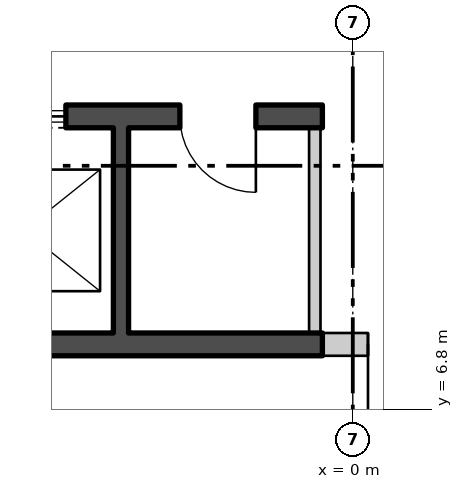
"""IFC4 building model, lengths in metres.
Left out: names, types, materials, properties, quantities, classifications, styles, units other than length and angle.
Written with IfcOpenShell. Run it as: python <this file> out.ifc"""

import sys

from ifc_helpers import new_model, si_unit, direction, frame, frame_2d, origin, place, context, subcontext, project, spatial, polyline, rectangle, outline, extrude, element, fill, save


model = new_model("IFC4")
c1 = context("Model", 3, precision=1e-05, world=origin(), true_north=direction((0.0, 1.0)))
c2 = subcontext(c1, "Body", "Model", "MODEL_VIEW")
j1 = project(units=[si_unit("LENGTHUNIT", "METRE"), si_unit("PLANEANGLEUNIT", "RADIAN")], contexts=[c1])
p1 = place(None, origin())
s1 = spatial("IfcSite", under=j1, at=p1, CompositionType="ELEMENT")
p2 = place(p1, origin())
s2 = spatial("IfcBuilding", under=s1, at=p2, CompositionType="ELEMENT")
p3 = place(p2, frame((0.0, 0.0, 280.5)))
s3 = spatial("IfcBuildingStorey", under=s2, at=p3, CompositionType="ELEMENT", Elevation=280.5)
p4 = place(p3, frame((-25.385, 15.619, -0.18), z_axis=(0.0, 0.0, 1.0), x_axis=(0.500000711659, -0.866024992908, 0.0)))
e1 = element("IfcWall", 1, at=p4, inside=s3, PredefinedType="SOLIDWALL", context=c2, shape_type="SweptSolid", body=[
    extrude(outline(polyline([(-0.13, -0.225), (45.87, -0.225), (45.61, 0.225), (0.13, 0.225), (-0.13, -0.225)])), origin(), (0.0, 0.0, 1.0), 3.68),
])
p5 = place(p4, frame((1.424, 0.0, 1.08)))
e2 = element("IfcOpeningElement", 2, at=p5, cuts=e1, PredefinedType="OPENING", context=c2, shape_type="SweptSolid", body=[
    extrude(rectangle(XDim=2.4, YDim=2.0, at=frame_2d((1.2, 1.0))), frame((0.0, 0.235, 0.0), z_axis=(0.0, -1.0, 0.0), x_axis=(1.0, 0.0, 0.0)), (0.0, 0.0, 1.0), 0.47),
])
p6 = place(p4, frame((5.893, 0.0, 1.08)))
e3 = element("IfcOpeningElement", 3, at=p6, cuts=e1, PredefinedType="OPENING", context=c2, shape_type="SweptSolid", body=[
    extrude(rectangle(XDim=2.4, YDim=2.0, at=frame_2d((1.2, 1.0))), frame((0.0, 0.235, 0.0), z_axis=(0.0, -1.0, 0.0), x_axis=(1.0, 0.0, 0.0)), (0.0, 0.0, 1.0), 0.47),
])
p7 = place(p4, frame((10.401, 0.0, 1.08)))
e4 = element("IfcOpeningElement", 4, at=p7, cuts=e1, PredefinedType="OPENING", context=c2, shape_type="SweptSolid", body=[
    extrude(rectangle(XDim=2.4, YDim=2.0, at=frame_2d((1.2, 1.0))), frame((0.0, 0.235, 0.0), z_axis=(0.0, -1.0, 0.0), x_axis=(1.0, 0.0, 0.0)), (0.0, 0.0, 1.0), 0.47),
])
p8 = place(p4, frame((14.909, 0.0, 1.08)))
e5 = element("IfcOpeningElement", 5, at=p8, cuts=e1, PredefinedType="OPENING", context=c2, shape_type="SweptSolid", body=[
    extrude(rectangle(XDim=2.4, YDim=2.0, at=frame_2d((1.2, 1.0))), frame((0.0, 0.235, 0.0), z_axis=(0.0, -1.0, 0.0), x_axis=(1.0, 0.0, 0.0)), (0.0, 0.0, 1.0), 0.47),
])
p9 = place(p4, frame((19.416, 0.0, 1.08)))
e6 = element("IfcOpeningElement", 6, at=p9, cuts=e1, PredefinedType="OPENING", context=c2, shape_type="SweptSolid", body=[
    extrude(rectangle(XDim=2.4, YDim=2.0, at=frame_2d((1.2, 1.0))), frame((0.0, 0.235, 0.0), z_axis=(0.0, -1.0, 0.0), x_axis=(1.0, 0.0, 0.0)), (0.0, 0.0, 1.0), 0.47),
])
p10 = place(p4, frame((23.924, 0.0, 1.08)))
e7 = element("IfcOpeningElement", 7, at=p10, cuts=e1, PredefinedType="OPENING", context=c2, shape_type="SweptSolid", body=[
    extrude(rectangle(XDim=2.4, YDim=2.0, at=frame_2d((1.2, 1.0))), frame((0.0, 0.235, 0.0), z_axis=(0.0, -1.0, 0.0), x_axis=(1.0, 0.0, 0.0)), (0.0, 0.0, 1.0), 0.47),
])
p11 = place(p4, frame((28.431, 0.0, 1.08)))
e8 = element("IfcOpeningElement", 8, at=p11, cuts=e1, PredefinedType="OPENING", context=c2, shape_type="SweptSolid", body=[
    extrude(rectangle(XDim=2.4, YDim=2.0, at=frame_2d((1.2, 1.0))), frame((0.0, 0.235, 0.0), z_axis=(0.0, -1.0, 0.0), x_axis=(1.0, 0.0, 0.0)), (0.0, 0.0, 1.0), 0.47),
])
p12 = place(p4, frame((32.939, 0.0, 1.08)))
e9 = element("IfcOpeningElement", 9, at=p12, cuts=e1, PredefinedType="OPENING", context=c2, shape_type="SweptSolid", body=[
    extrude(rectangle(XDim=2.4, YDim=2.0, at=frame_2d((1.2, 1.0))), frame((0.0, 0.235, 0.0), z_axis=(0.0, -1.0, 0.0), x_axis=(1.0, 0.0, 0.0)), (0.0, 0.0, 1.0), 0.47),
])
p13 = place(p4, frame((37.447, 0.0, 1.08)))
e10 = element("IfcOpeningElement", 10, at=p13, cuts=e1, PredefinedType="OPENING", context=c2, shape_type="SweptSolid", body=[
    extrude(rectangle(XDim=2.4, YDim=2.0, at=frame_2d((1.2, 1.0))), frame((0.0, 0.235, 0.0), z_axis=(0.0, -1.0, 0.0), x_axis=(1.0, 0.0, 0.0)), (0.0, 0.0, 1.0), 0.47),
])
p14 = place(p4, frame((41.916, 0.0, 1.08)))
e11 = element("IfcOpeningElement", 11, at=p14, cuts=e1, PredefinedType="OPENING", context=c2, shape_type="SweptSolid", body=[
    extrude(rectangle(XDim=2.4, YDim=2.0, at=frame_2d((1.2, 1.0))), frame((0.0, 0.235, 0.0), z_axis=(0.0, -1.0, 0.0), x_axis=(1.0, 0.0, 0.0)), (0.0, 0.0, 1.0), 0.47),
])
p15 = place(p3, frame((-10.7, 10.65, 0.0), z_axis=(0.0, 0.0, 1.0), x_axis=(1.0, 0.0, 0.0)))
e12 = element("IfcWall", 12, at=p15, inside=s3, PredefinedType="SHEAR", context=c2, shape_type="SweptSolid", body=[
    extrude(rectangle(XDim=10.3, YDim=0.3, at=frame_2d((5.15, 0.0))), origin(), (0.0, 0.0, 1.0), 3.7),
])
p16 = place(p15, frame((0.675, 0.0, 0.0)))
e13 = element("IfcOpeningElement", 13, at=p16, cuts=e12, PredefinedType="OPENING", context=c2, shape_type="SweptSolid", body=[
    extrude(rectangle(XDim=1.1, YDim=2.1, at=frame_2d((0.55, 1.05))), frame((0.0, 0.16, 0.0), z_axis=(0.0, -1.0, 0.0), x_axis=(1.0, 0.0, 0.0)), (0.0, 0.0, 1.0), 0.32),
])
p17 = place(p15, frame((3.275, 0.0, 0.0)))
e14 = element("IfcOpeningElement", 14, at=p17, cuts=e12, PredefinedType="OPENING", context=c2, shape_type="SweptSolid", body=[
    extrude(rectangle(XDim=1.1, YDim=2.1, at=frame_2d((0.55, 1.05))), frame((0.0, 0.16, 0.0), z_axis=(0.0, -1.0, 0.0), x_axis=(1.0, 0.0, 0.0)), (0.0, 0.0, 1.0), 0.32),
])
p18 = place(p15, frame((5.825, 0.0, 0.0)))
e15 = element("IfcOpeningElement", 15, at=p18, cuts=e12, PredefinedType="OPENING", context=c2, shape_type="SweptSolid", body=[
    extrude(rectangle(XDim=1.1, YDim=2.1, at=frame_2d((0.55, 1.05))), frame((0.0, 0.16, 0.0), z_axis=(0.0, -1.0, 0.0), x_axis=(1.0, 0.0, 0.0)), (0.0, 0.0, 1.0), 0.32),
])
p19 = place(p15, frame((8.425, 0.0, 0.0)))
e16 = element("IfcOpeningElement", 16, at=p19, cuts=e12, PredefinedType="OPENING", context=c2, shape_type="SweptSolid", body=[
    extrude(rectangle(XDim=1.0, YDim=2.1, at=frame_2d((0.5, 1.05))), frame((0.0, 0.16, 0.0), z_axis=(0.0, -1.0, 0.0), x_axis=(1.0, 0.0, 0.0)), (0.0, 0.0, 1.0), 0.32),
])
p20 = place(p3, frame((-10.7, 7.65, 0.0), z_axis=(0.0, 0.0, 1.0), x_axis=(1.0, 0.0, 0.0)))
e17 = element("IfcWall", 17, at=p20, inside=s3, PredefinedType="SHEAR", context=c2, shape_type="SweptSolid", body=[
    extrude(rectangle(XDim=10.3, YDim=0.3, at=frame_2d((5.15, 0.0))), origin(), (0.0, 0.0, 1.0), 3.7),
])
p21 = place(p3, frame((-3.05, 7.8, 0.0), z_axis=(0.0, 0.0, 1.0), x_axis=(0.0, 1.0, 0.0)))
e18 = element("IfcWall", 18, at=p21, inside=s3, PredefinedType="SHEAR", context=c2, shape_type="SweptSolid", body=[
    extrude(rectangle(XDim=2.7, YDim=0.2, at=frame_2d((1.35, 0.0))), origin(), (0.0, 0.0, 1.0), 3.7),
])
p22 = place(p3, frame((-0.5, 7.8, 0.0), z_axis=(0.0, 0.0, 1.0), x_axis=(0.0, 1.0, 0.0)))
e19 = element("IfcWall", 19, at=p22, inside=s3, PredefinedType="PARTITIONING", context=c2, shape_type="SweptSolid", body=[
    extrude(rectangle(XDim=2.7, YDim=0.15, at=frame_2d((1.35, 0.0))), origin(), (0.0, 0.0, 1.0), 3.7),
])
p23 = place(p3, frame((-0.4, 7.65, 0.0), z_axis=(0.0, 0.0, 1.0), x_axis=(1.0, 0.0, 0.0)))
e20 = element("IfcWall", 20, at=p23, inside=s3, PredefinedType="PARTITIONING", context=c2, shape_type="SweptSolid", body=[
    extrude(rectangle(XDim=3.0, YDim=0.3, at=frame_2d((1.5, 0.0))), origin(), (0.0, 0.0, 1.0), 3.7),
])
p24 = place(p23, frame((0.6, 0.0, 0.0)))
e21 = element("IfcOpeningElement", 21, at=p24, cuts=e20, PredefinedType="OPENING", context=c2, shape_type="SweptSolid", body=[
    extrude(rectangle(XDim=1.8, YDim=2.4, at=frame_2d((0.9, 1.2))), frame((0.0, 0.16, 0.0), z_axis=(0.0, -1.0, 0.0), x_axis=(1.0, 0.0, 0.0)), (0.0, 0.0, 1.0), 0.32),
])
p25 = place(p18, origin())
e22 = element("IfcDoor", 22, at=p25, inside=s3, OperationType="SLIDING_TO_LEFT", PredefinedType="DOOR", context=c2, shape_type="SweptSolid", body=[
    extrude(rectangle(XDim=1.1, YDim=2.1, at=frame_2d((0.55, 1.05))), frame((0.0, 0.025, 0.0), z_axis=(0.0, -1.0, 0.0), x_axis=(1.0, 0.0, 0.0)), (0.0, 0.0, 1.0), 0.05),
])
fill(e15, e22)
p26 = place(p19, origin())
e23 = element("IfcDoor", 23, at=p26, inside=s3, OperationType="SINGLE_SWING_RIGHT", PredefinedType="DOOR", context=c2, shape_type="SweptSolid", body=[
    extrude(rectangle(XDim=1.0, YDim=2.1, at=frame_2d((0.5, 1.05))), frame((0.0, 0.025, 0.0), z_axis=(0.0, -1.0, 0.0), x_axis=(1.0, 0.0, 0.0)), (0.0, 0.0, 1.0), 0.05),
])
fill(e16, e23)
p27 = place(p24, origin())
e24 = element("IfcDoor", 24, at=p27, inside=s3, OperationType="DOUBLE_DOOR_SINGLE_SWING", PredefinedType="DOOR", context=c2, shape_type="SweptSolid", body=[
    extrude(rectangle(XDim=1.8, YDim=2.4, at=frame_2d((0.9, 1.2))), frame((0.0, 0.025, 0.0), z_axis=(0.0, -1.0, 0.0), x_axis=(1.0, 0.0, 0.0)), (0.0, 0.0, 1.0), 0.05),
])
fill(e21, e24)
save(model, sys.argv[1])
